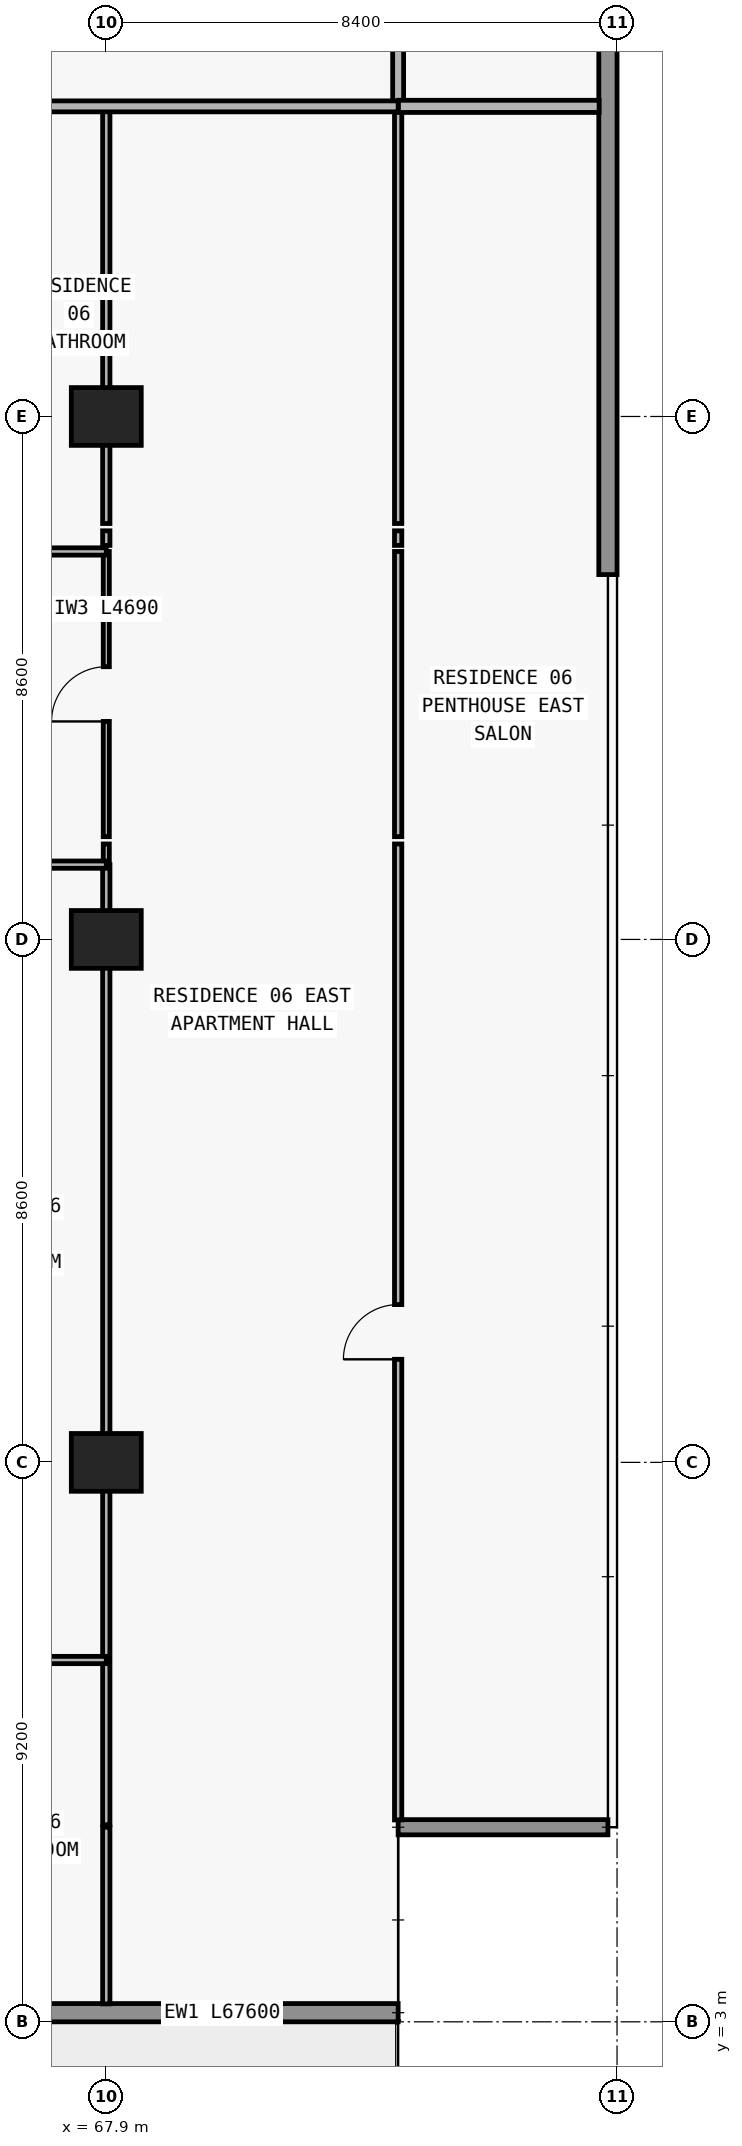
"""IFC4 building model, lengths in metres.
Left out: names, types, materials, properties, quantities, classifications, styles, units other than length and angle.
Written with IfcOpenShell. Run it as: python <this file> out.ifc"""

import sys

from ifc_helpers import new_model, si_unit, direction, frame, frame_2d, origin, origin_2d, place, context, subcontext, project, spatial, rectangle, extrude, element, fill, save


model = new_model("IFC4")
c1 = context("Model", 3, precision=1e-05, world=origin(), true_north=direction((0.0, 1.0)))
c2 = subcontext(c1, "Body", "Model", "MODEL_VIEW")
j1 = project(units=[si_unit("LENGTHUNIT", "METRE"), si_unit("PLANEANGLEUNIT", "RADIAN")], contexts=[c1])
p1 = place(None, origin())
s1 = spatial("IfcSite", under=j1, at=p1, CompositionType="ELEMENT")
p2 = place(p1, origin())
s2 = spatial("IfcBuilding", under=s1, at=p2, CompositionType="ELEMENT")
p3 = place(p2, frame((0.0, 0.0, 33.3)))
s3 = spatial("IfcBuildingStorey", under=s2, at=p3, CompositionType="ELEMENT", Elevation=33.3)
for number, where, z_axis, x_axis in (
    (1, (67.9, 12.2, 0.0), (0.0, 0.0, 1.0), (1.0, 0.0, 0.0)),
    (2, (67.9, 20.8, 0.0), (0.0, 0.0, 1.0), (1.0, 0.0, 0.0)),
    (3, (67.9, 29.4, 0.0), (0.0, 0.0, 1.0), (1.0, 0.0, 0.0)),
):
    element("IfcColumn", number, at=place(p3, frame(where, z_axis=z_axis, x_axis=x_axis)), inside=s3, PredefinedType="COLUMN", context=c2, shape_type="SweptSolid", body=[
        extrude(rectangle(XDim=1.15, YDim=0.95, at=origin_2d()), origin(), (0.0, 0.0, 1.0), 3.05),
    ])
p4 = place(p3, frame((72.7, 3.15, 0.0), z_axis=(0.0, 0.0, 1.0), x_axis=(-1.0, 0.0, 0.0)))
e4 = element("IfcWall", 4, at=p4, inside=s3, PredefinedType="STANDARD", context=c2, shape_type="SweptSolid", body=[
    extrude(rectangle(XDim=67.6, YDim=0.3, at=frame_2d((33.8, 0.0))), origin(), (0.0, 0.0, 1.0), 3.05),
])
p5 = place(p4, frame((59.826, 0.0, 0.0)))
e5 = element("IfcOpeningElement", 5, at=p5, cuts=e4, PredefinedType="OPENING", context=c2, shape_type="SweptSolid", body=[
    extrude(rectangle(XDim=2.0, YDim=2.3, at=frame_2d((1.0, 1.15))), frame((0.0, 0.16, 0.0), z_axis=(0.0, -1.0, 0.0), x_axis=(1.0, 0.0, 0.0)), (0.0, 0.0, 1.0), 0.32),
])
p6 = place(p4, frame((55.526, 0.0, 0.85)))
e6 = element("IfcOpeningElement", 6, at=p6, cuts=e4, PredefinedType="OPENING", context=c2, shape_type="SweptSolid", body=[
    extrude(rectangle(XDim=2.2, YDim=1.55, at=frame_2d((1.1, 0.775))), frame((0.0, 0.16, 0.0), z_axis=(0.0, -1.0, 0.0), x_axis=(1.0, 0.0, 0.0)), (0.0, 0.0, 1.0), 0.32),
])
p7 = place(p4, frame((51.09, 0.0, 0.0)))
e7 = element("IfcOpeningElement", 7, at=p7, cuts=e4, PredefinedType="OPENING", context=c2, shape_type="SweptSolid", body=[
    extrude(rectangle(XDim=2.0, YDim=2.3, at=frame_2d((1.0, 1.15))), frame((0.0, 0.16, 0.0), z_axis=(0.0, -1.0, 0.0), x_axis=(1.0, 0.0, 0.0)), (0.0, 0.0, 1.0), 0.32),
])
p8 = place(p4, frame((46.99, 0.0, 0.85)))
e8 = element("IfcOpeningElement", 8, at=p8, cuts=e4, PredefinedType="OPENING", context=c2, shape_type="SweptSolid", body=[
    extrude(rectangle(XDim=1.8, YDim=1.55, at=frame_2d((0.9, 0.775))), frame((0.0, 0.16, 0.0), z_axis=(0.0, -1.0, 0.0), x_axis=(1.0, 0.0, 0.0)), (0.0, 0.0, 1.0), 0.32),
])
p9 = place(p4, frame((43.026, 0.0, 0.0)))
e9 = element("IfcOpeningElement", 9, at=p9, cuts=e4, PredefinedType="OPENING", context=c2, shape_type="SweptSolid", body=[
    extrude(rectangle(XDim=2.0, YDim=2.3, at=frame_2d((1.0, 1.15))), frame((0.0, 0.16, 0.0), z_axis=(0.0, -1.0, 0.0), x_axis=(1.0, 0.0, 0.0)), (0.0, 0.0, 1.0), 0.32),
])
p10 = place(p4, frame((38.726, 0.0, 0.85)))
e10 = element("IfcOpeningElement", 10, at=p10, cuts=e4, PredefinedType="OPENING", context=c2, shape_type="SweptSolid", body=[
    extrude(rectangle(XDim=2.2, YDim=1.55, at=frame_2d((1.1, 0.775))), frame((0.0, 0.16, 0.0), z_axis=(0.0, -1.0, 0.0), x_axis=(1.0, 0.0, 0.0)), (0.0, 0.0, 1.0), 0.32),
])
p11 = place(p4, frame((34.69, 0.0, 0.0)))
e11 = element("IfcOpeningElement", 11, at=p11, cuts=e4, PredefinedType="OPENING", context=c2, shape_type="SweptSolid", body=[
    extrude(rectangle(XDim=2.0, YDim=2.3, at=frame_2d((1.0, 1.15))), frame((0.0, 0.16, 0.0), z_axis=(0.0, -1.0, 0.0), x_axis=(1.0, 0.0, 0.0)), (0.0, 0.0, 1.0), 0.32),
])
p12 = place(p4, frame((30.81, 0.0, 0.65)))
e12 = element("IfcOpeningElement", 12, at=p12, cuts=e4, PredefinedType="OPENING", context=c2, shape_type="SweptSolid", body=[
    extrude(rectangle(XDim=2.6, YDim=1.85, at=frame_2d((1.3, 0.925))), frame((0.0, 0.16, 0.0), z_axis=(0.0, -1.0, 0.0), x_axis=(1.0, 0.0, 0.0)), (0.0, 0.0, 1.0), 0.32),
])
p13 = place(p4, frame((24.7, 0.0, 0.85)))
e13 = element("IfcOpeningElement", 13, at=p13, cuts=e4, PredefinedType="OPENING", context=c2, shape_type="SweptSolid", body=[
    extrude(rectangle(XDim=2.2, YDim=1.55, at=frame_2d((1.1, 0.775))), frame((0.0, 0.16, 0.0), z_axis=(0.0, -1.0, 0.0), x_axis=(1.0, 0.0, 0.0)), (0.0, 0.0, 1.0), 0.32),
])
p14 = place(p4, frame((18.626, 0.0, 0.0)))
e14 = element("IfcOpeningElement", 14, at=p14, cuts=e4, PredefinedType="OPENING", context=c2, shape_type="SweptSolid", body=[
    extrude(rectangle(XDim=2.0, YDim=2.3, at=frame_2d((1.0, 1.15))), frame((0.0, 0.16, 0.0), z_axis=(0.0, -1.0, 0.0), x_axis=(1.0, 0.0, 0.0)), (0.0, 0.0, 1.0), 0.32),
])
p15 = place(p4, frame((14.326, 0.0, 0.85)))
e15 = element("IfcOpeningElement", 15, at=p15, cuts=e4, PredefinedType="OPENING", context=c2, shape_type="SweptSolid", body=[
    extrude(rectangle(XDim=2.2, YDim=1.55, at=frame_2d((1.1, 0.775))), frame((0.0, 0.16, 0.0), z_axis=(0.0, -1.0, 0.0), x_axis=(1.0, 0.0, 0.0)), (0.0, 0.0, 1.0), 0.32),
])
p16 = place(p4, frame((9.89, 0.0, 0.0)))
e16 = element("IfcOpeningElement", 16, at=p16, cuts=e4, PredefinedType="OPENING", context=c2, shape_type="SweptSolid", body=[
    extrude(rectangle(XDim=2.0, YDim=2.3, at=frame_2d((1.0, 1.15))), frame((0.0, 0.16, 0.0), z_axis=(0.0, -1.0, 0.0), x_axis=(1.0, 0.0, 0.0)), (0.0, 0.0, 1.0), 0.32),
])
p17 = place(p4, frame((5.79, 0.0, 0.85)))
e17 = element("IfcOpeningElement", 17, at=p17, cuts=e4, PredefinedType="OPENING", context=c2, shape_type="SweptSolid", body=[
    extrude(rectangle(XDim=1.8, YDim=1.55, at=frame_2d((0.9, 0.775))), frame((0.0, 0.16, 0.0), z_axis=(0.0, -1.0, 0.0), x_axis=(1.0, 0.0, 0.0)), (0.0, 0.0, 1.0), 0.32),
])
p18 = place(p3, frame((72.7, 6.2, 0.0), z_axis=(0.0, 0.0, 1.0), x_axis=(1.0, 0.0, 0.0)))
e18 = element("IfcWall", 18, at=p18, inside=s3, PredefinedType="ELEMENTEDWALL", context=c2, shape_type="SweptSolid", body=[
    extrude(rectangle(XDim=3.45, YDim=0.25, at=frame_2d((1.725, 0.0))), origin(), (0.0, 0.0, 1.0), 3.05),
])
p19 = place(p3, frame((76.15, 47.4, 0.0), z_axis=(0.0, 0.0, 1.0), x_axis=(0.0, -1.0, 0.0)))
e19 = element("IfcWall", 19, at=p19, inside=s3, PredefinedType="STANDARD", context=c2, shape_type="SweptSolid", body=[
    extrude(rectangle(XDim=20.6, YDim=0.3, at=frame_2d((10.3, 0.0))), origin(), (0.0, 0.0, 1.0), 3.05),
])
p20 = place(p3, frame((67.9, 3.295, 0.0), z_axis=(0.0, 0.0, 1.0), x_axis=(0.0, 1.0, 0.0)))
e20 = element("IfcWall", 20, at=p20, inside=s3, PredefinedType="PARTITIONING", context=c2, shape_type="SweptSolid", body=[
    extrude(rectangle(XDim=2.905, YDim=0.12, at=frame_2d((1.453, 0.0))), origin(), (0.0, 0.0, 1.0), 3.05),
])
p21 = place(p3, frame((67.9, 6.24, 0.0), z_axis=(0.0, 0.0, 1.0), x_axis=(0.0, 1.0, 0.0)))
e21 = element("IfcWall", 21, at=p21, inside=s3, PredefinedType="PARTITIONING", context=c2, shape_type="SweptSolid", body=[
    extrude(rectangle(XDim=15.79, YDim=0.12, at=frame_2d((7.895, 0.0))), origin(), (0.0, 0.0, 1.0), 2.11),
])
p22 = place(p3, frame((67.9, 22.035, 0.0), z_axis=(0.0, 0.0, 1.0), x_axis=(0.0, 1.0, 0.0)))
e22 = element("IfcWall", 22, at=p22, inside=s3, PredefinedType="MOVABLE", context=c2, shape_type="SweptSolid", body=[
    extrude(rectangle(XDim=0.335, YDim=0.1, at=frame_2d((0.167, 0.0))), origin(), (0.0, 0.0, 1.0), 2.11),
])
p23 = place(p3, frame((67.9, 22.49, 0.0), z_axis=(0.0, 0.0, 1.0), x_axis=(0.0, 1.0, 0.0)))
e23 = element("IfcWall", 23, at=p23, inside=s3, PredefinedType="MOVABLE", context=c2, shape_type="SweptSolid", body=[
    extrude(rectangle(XDim=4.69, YDim=0.1, at=frame_2d((2.345, 0.0))), origin(), (0.0, 0.0, 1.0), 2.11),
])
p24 = place(p23, frame((1.895, 0.0, 0.0)))
e24 = element("IfcOpeningElement", 24, at=p24, cuts=e23, PredefinedType="OPENING", context=c2, shape_type="SweptSolid", body=[
    extrude(rectangle(XDim=0.9, YDim=2.06, at=frame_2d((0.45, 1.03))), frame((0.0, 0.06, 0.0), z_axis=(0.0, -1.0, 0.0), x_axis=(1.0, 0.0, 0.0)), (0.0, 0.0, 1.0), 0.12),
])
p25 = place(p3, frame((67.9, 27.28, 0.0), z_axis=(0.0, 0.0, 1.0), x_axis=(0.0, 1.0, 0.0)))
e25 = element("IfcWall", 25, at=p25, inside=s3, PredefinedType="PARTITIONING", context=c2, shape_type="SweptSolid", body=[
    extrude(rectangle(XDim=0.24, YDim=0.12, at=frame_2d((0.12, 0.0))), origin(), (0.0, 0.0, 1.0), 2.11),
])
p26 = place(p3, frame((67.9, 27.64, 0.0), z_axis=(0.0, 0.0, 1.0), x_axis=(0.0, 1.0, 0.0)))
e26 = element("IfcWall", 26, at=p26, inside=s3, PredefinedType="PARTITIONING", context=c2, shape_type="SweptSolid", body=[
    extrude(rectangle(XDim=6.86, YDim=0.12, at=frame_2d((3.43, 0.0))), origin(), (0.0, 0.0, 1.0), 2.11),
])
p27 = place(p3, frame((72.7, 6.32, 0.0), z_axis=(0.0, 0.0, 1.0), x_axis=(0.0, 1.0, 0.0)))
e27 = element("IfcWall", 27, at=p27, inside=s3, PredefinedType="PARTITIONING", context=c2, shape_type="SweptSolid", body=[
    extrude(rectangle(XDim=16.05, YDim=0.12, at=frame_2d((8.025, 0.0))), origin(), (0.0, 0.0, 1.0), 3.05),
])
p28 = place(p27, frame((7.575, 0.0, 0.0)))
e28 = element("IfcOpeningElement", 28, at=p28, cuts=e27, PredefinedType="OPENING", context=c2, shape_type="SweptSolid", body=[
    extrude(rectangle(XDim=0.9, YDim=2.15, at=frame_2d((0.45, 1.075))), frame((0.0, 0.07, 0.0), z_axis=(0.0, -1.0, 0.0), x_axis=(1.0, 0.0, 0.0)), (0.0, 0.0, 1.0), 0.14),
])
p29 = place(p3, frame((72.7, 22.49, 0.0), z_axis=(0.0, 0.0, 1.0), x_axis=(0.0, 1.0, 0.0)))
e29 = element("IfcWall", 29, at=p29, inside=s3, PredefinedType="PARTITIONING", context=c2, shape_type="SweptSolid", body=[
    extrude(rectangle(XDim=4.69, YDim=0.12, at=frame_2d((2.345, 0.0))), origin(), (0.0, 0.0, 1.0), 3.05),
])
p30 = place(p3, frame((72.7, 27.28, 0.0), z_axis=(0.0, 0.0, 1.0), x_axis=(0.0, 1.0, 0.0)))
e30 = element("IfcWall", 30, at=p30, inside=s3, PredefinedType="PARTITIONING", context=c2, shape_type="SweptSolid", body=[
    extrude(rectangle(XDim=0.24, YDim=0.12, at=frame_2d((0.12, 0.0))), origin(), (0.0, 0.0, 1.0), 3.05),
])
p31 = place(p3, frame((72.7, 27.64, 0.0), z_axis=(0.0, 0.0, 1.0), x_axis=(0.0, 1.0, 0.0)))
e31 = element("IfcWall", 31, at=p31, inside=s3, PredefinedType="PARTITIONING", context=c2, shape_type="SweptSolid", body=[
    extrude(rectangle(XDim=6.86, YDim=0.12, at=frame_2d((3.43, 0.0))), origin(), (0.0, 0.0, 1.0), 3.05),
])
p32 = place(p3, frame((72.7, 34.505, 0.0), z_axis=(0.0, 0.0, 1.0), x_axis=(0.0, 1.0, 0.0)))
e32 = element("IfcWall", 32, at=p32, inside=s3, PredefinedType="PARTITIONING", context=c2, shape_type="SweptSolid", body=[
    extrude(rectangle(XDim=2.395, YDim=0.18, at=frame_2d((1.198, 0.0))), origin(), (0.0, 0.0, 1.0), 3.05),
])
p33 = place(p3, frame((64.12, 8.95, 0.0), z_axis=(0.0, 0.0, 1.0), x_axis=(1.0, 0.0, 0.0)))
e33 = element("IfcWall", 33, at=p33, inside=s3, PredefinedType="PARTITIONING", context=c2, shape_type="SweptSolid", body=[
    extrude(rectangle(XDim=3.78, YDim=0.12, at=frame_2d((1.89, 0.0))), origin(), (0.0, 0.0, 1.0), 3.05),
])
p34 = place(p33, frame((1.44, 0.0, 0.0)))
e34 = element("IfcOpeningElement", 34, at=p34, cuts=e33, PredefinedType="OPENING", context=c2, shape_type="SweptSolid", body=[
    extrude(rectangle(XDim=0.9, YDim=2.15, at=frame_2d((0.45, 1.075))), frame((0.0, 0.07, 0.0), z_axis=(0.0, -1.0, 0.0), x_axis=(1.0, 0.0, 0.0)), (0.0, 0.0, 1.0), 0.14),
])
p35 = place(p3, frame((59.5, 22.03, 0.0), z_axis=(0.0, 0.0, 1.0), x_axis=(1.0, 0.0, 0.0)))
e35 = element("IfcWall", 35, at=p35, inside=s3, PredefinedType="PARTITIONING", context=c2, shape_type="SweptSolid", body=[
    extrude(rectangle(XDim=8.4, YDim=0.12, at=frame_2d((4.2, 0.0))), origin(), (0.0, 0.0, 1.0), 3.05),
])
p36 = place(p35, frame((1.693, 0.0, 0.0)))
e36 = element("IfcOpeningElement", 36, at=p36, cuts=e35, PredefinedType="OPENING", context=c2, shape_type="SweptSolid", body=[
    extrude(rectangle(XDim=0.9, YDim=2.15, at=frame_2d((0.45, 1.075))), frame((0.0, 0.07, 0.0), z_axis=(0.0, -1.0, 0.0), x_axis=(1.0, 0.0, 0.0)), (0.0, 0.0, 1.0), 0.14),
])
p37 = place(p35, frame((6.06, 0.0, 0.0)))
e37 = element("IfcOpeningElement", 37, at=p37, cuts=e35, PredefinedType="OPENING", context=c2, shape_type="SweptSolid", body=[
    extrude(rectangle(XDim=0.9, YDim=2.15, at=frame_2d((0.45, 1.075))), frame((0.0, 0.07, 0.0), z_axis=(0.0, -1.0, 0.0), x_axis=(1.0, 0.0, 0.0)), (0.0, 0.0, 1.0), 0.14),
])
p38 = place(p3, frame((59.5, 27.18, 0.0), z_axis=(0.0, 0.0, 1.0), x_axis=(1.0, 0.0, 0.0)))
e38 = element("IfcWall", 38, at=p38, inside=s3, PredefinedType="PARTITIONING", context=c2, shape_type="SweptSolid", body=[
    extrude(rectangle(XDim=8.4, YDim=0.12, at=frame_2d((4.2, 0.0))), origin(), (0.0, 0.0, 1.0), 3.05),
])
p39 = place(p38, frame((1.693, 0.0, 0.0)))
e39 = element("IfcOpeningElement", 39, at=p39, cuts=e38, PredefinedType="OPENING", context=c2, shape_type="SweptSolid", body=[
    extrude(rectangle(XDim=0.9, YDim=2.15, at=frame_2d((0.45, 1.075))), frame((0.0, 0.07, 0.0), z_axis=(0.0, -1.0, 0.0), x_axis=(1.0, 0.0, 0.0)), (0.0, 0.0, 1.0), 0.14),
])
p40 = place(p3, frame((55.9, 34.5, 0.0), z_axis=(0.0, 0.0, 1.0), x_axis=(1.0, 0.0, 0.0)))
e40 = element("IfcWall", 40, at=p40, inside=s3, PredefinedType="PARTITIONING", context=c2, shape_type="SweptSolid", body=[
    extrude(rectangle(XDim=16.8, YDim=0.18, at=frame_2d((8.4, 0.0))), origin(), (0.0, 0.0, 1.0), 3.05),
])
p41 = place(p40, frame((6.475, 0.0, 0.0)))
e41 = element("IfcOpeningElement", 41, at=p41, cuts=e40, PredefinedType="OPENING", context=c2, shape_type="SweptSolid", body=[
    extrude(rectangle(XDim=1.0, YDim=2.2, at=frame_2d((0.5, 1.1))), frame((0.0, 0.1, 0.0), z_axis=(0.0, -1.0, 0.0), x_axis=(1.0, 0.0, 0.0)), (0.0, 0.0, 1.0), 0.2),
])
p42 = place(p3, frame((72.705, 34.5, 0.0), z_axis=(0.0, 0.0, 1.0), x_axis=(1.0, 0.0, 0.0)))
e42 = element("IfcWall", 42, at=p42, inside=s3, PredefinedType="PARTITIONING", context=c2, shape_type="SweptSolid", body=[
    extrude(rectangle(XDim=3.3, YDim=0.2, at=frame_2d((1.65, 0.0))), origin(), (0.0, 0.0, 1.0), 3.05),
])
p43 = place(p24, origin())
e43 = element("IfcDoor", 43, at=p43, inside=s3, OperationType="SINGLE_SWING_LEFT", PredefinedType="DOOR", context=c2, shape_type="SweptSolid", body=[
    extrude(rectangle(XDim=0.9, YDim=2.06, at=frame_2d((0.45, 1.03))), frame((0.0, 0.025, 0.0), z_axis=(0.0, -1.0, 0.0), x_axis=(1.0, 0.0, 0.0)), (0.0, 0.0, 1.0), 0.05),
])
fill(e24, e43)
p44 = place(p28, origin())
e44 = element("IfcDoor", 44, at=p44, inside=s3, OperationType="SINGLE_SWING_LEFT", PredefinedType="DOOR", context=c2, shape_type="SweptSolid", body=[
    extrude(rectangle(XDim=0.9, YDim=2.15, at=frame_2d((0.45, 1.075))), frame((0.0, 0.025, 0.0), z_axis=(0.0, -1.0, 0.0), x_axis=(1.0, 0.0, 0.0)), (0.0, 0.0, 1.0), 0.05),
])
fill(e28, e44)
save(model, sys.argv[1])
